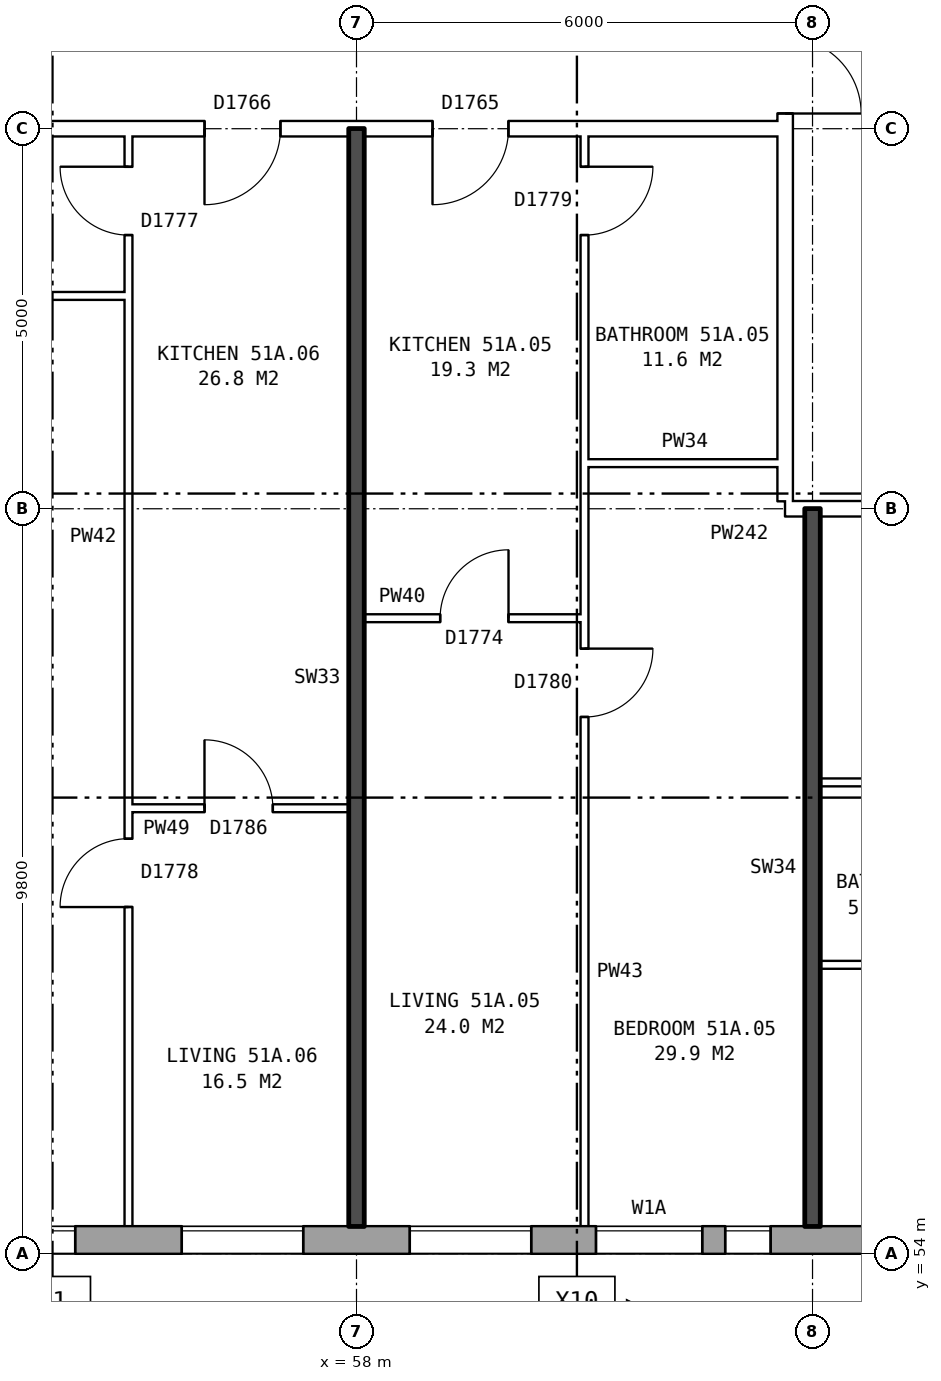
"""IFC4 building model, lengths in metres.
Left out: names, types, materials, properties, quantities, classifications, styles, units other than length and angle.
Written with IfcOpenShell. Run it as: python <this file> out.ifc"""

import sys

from ifc_helpers import new_model, si_unit, direction, frame, frame_2d, origin, place, context, subcontext, project, spatial, rectangle, extrude, element, fill, save


model = new_model("IFC4")
c1 = context("Model", 3, precision=1e-05, world=origin(), true_north=direction((0.0, 1.0)))
c2 = subcontext(c1, "Body", "Model", "MODEL_VIEW")
j1 = project(units=[si_unit("LENGTHUNIT", "METRE"), si_unit("PLANEANGLEUNIT", "RADIAN")], contexts=[c1])
p1 = place(None, origin())
s1 = spatial("IfcSite", under=j1, at=p1, CompositionType="ELEMENT")
p2 = place(p1, origin())
s2 = spatial("IfcBuilding", under=s1, at=p2, CompositionType="ELEMENT")
p3 = place(p2, frame((0.0, 0.0, 182.0)))
s3 = spatial("IfcBuildingStorey", under=s2, at=p3, CompositionType="ELEMENT", Elevation=182.0)
p4 = place(p3, frame((33.325, 54.18, 0.0), z_axis=(0.0, 0.0, 1.0), x_axis=(1.0, 0.0, 0.0)))
e1 = element("IfcWall", 1, at=p4, inside=s3, PredefinedType="STANDARD", context=c2, shape_type="SweptSolid", body=[
    extrude(rectangle(XDim=39.601, YDim=0.36, at=frame_2d((19.8, 0.0))), origin(), (0.0, 0.0, 1.0), 2.85),
])
p5 = place(p4, frame((1.375, 0.0, 0.8)))
e2 = element("IfcOpeningElement", 2, at=p5, cuts=e1, PredefinedType="OPENING", context=c2, shape_type="SweptSolid", body=[
    extrude(rectangle(XDim=1.6, YDim=1.8, at=frame_2d((0.8, 0.9))), frame((0.0, 0.19, 0.0), z_axis=(0.0, -1.0, 0.0), x_axis=(1.0, 0.0, 0.0)), (0.0, 0.0, 1.0), 0.38),
])
p6 = place(p4, frame((4.375, 0.0, 0.8)))
e3 = element("IfcOpeningElement", 3, at=p6, cuts=e1, PredefinedType="OPENING", context=c2, shape_type="SweptSolid", body=[
    extrude(rectangle(XDim=1.6, YDim=1.8, at=frame_2d((0.8, 0.9))), frame((0.0, 0.19, 0.0), z_axis=(0.0, -1.0, 0.0), x_axis=(1.0, 0.0, 0.0)), (0.0, 0.0, 1.0), 0.38),
])
p7 = place(p4, frame((6.875, 0.0, 0.8)))
e4 = element("IfcOpeningElement", 4, at=p7, cuts=e1, PredefinedType="OPENING", context=c2, shape_type="SweptSolid", body=[
    extrude(rectangle(XDim=1.0, YDim=1.8, at=frame_2d((0.5, 0.9))), frame((0.0, 0.19, 0.0), z_axis=(0.0, -1.0, 0.0), x_axis=(1.0, 0.0, 0.0)), (0.0, 0.0, 1.0), 0.38),
])
p8 = place(p4, frame((8.175, 0.0, 1.7)))
e5 = element("IfcOpeningElement", 5, at=p8, cuts=e1, PredefinedType="OPENING", context=c2, shape_type="SweptSolid", body=[
    extrude(rectangle(XDim=0.6, YDim=0.9, at=frame_2d((0.3, 0.45))), frame((0.0, 0.19, 0.0), z_axis=(0.0, -1.0, 0.0), x_axis=(1.0, 0.0, 0.0)), (0.0, 0.0, 1.0), 0.38),
])
p9 = place(p4, frame((13.375, 0.0, 0.8)))
e6 = element("IfcOpeningElement", 6, at=p9, cuts=e1, PredefinedType="OPENING", context=c2, shape_type="SweptSolid", body=[
    extrude(rectangle(XDim=1.6, YDim=1.8, at=frame_2d((0.8, 0.9))), frame((0.0, 0.19, 0.0), z_axis=(0.0, -1.0, 0.0), x_axis=(1.0, 0.0, 0.0)), (0.0, 0.0, 1.0), 0.38),
])
p10 = place(p4, frame((16.375, 0.0, 0.8)))
e7 = element("IfcOpeningElement", 7, at=p10, cuts=e1, PredefinedType="OPENING", context=c2, shape_type="SweptSolid", body=[
    extrude(rectangle(XDim=1.6, YDim=1.8, at=frame_2d((0.8, 0.9))), frame((0.0, 0.19, 0.0), z_axis=(0.0, -1.0, 0.0), x_axis=(1.0, 0.0, 0.0)), (0.0, 0.0, 1.0), 0.38),
])
p11 = place(p4, frame((19.375, 0.0, 0.8)))
e8 = element("IfcOpeningElement", 8, at=p11, cuts=e1, PredefinedType="OPENING", context=c2, shape_type="SweptSolid", body=[
    extrude(rectangle(XDim=1.6, YDim=1.8, at=frame_2d((0.8, 0.9))), frame((0.0, 0.19, 0.0), z_axis=(0.0, -1.0, 0.0), x_axis=(1.0, 0.0, 0.0)), (0.0, 0.0, 1.0), 0.38),
])
p12 = place(p4, frame((22.375, 0.0, 0.8)))
e9 = element("IfcOpeningElement", 9, at=p12, cuts=e1, PredefinedType="OPENING", context=c2, shape_type="SweptSolid", body=[
    extrude(rectangle(XDim=1.6, YDim=1.8, at=frame_2d((0.8, 0.9))), frame((0.0, 0.19, 0.0), z_axis=(0.0, -1.0, 0.0), x_axis=(1.0, 0.0, 0.0)), (0.0, 0.0, 1.0), 0.38),
])
p13 = place(p4, frame((25.375, 0.0, 0.8)))
e10 = element("IfcOpeningElement", 10, at=p13, cuts=e1, PredefinedType="OPENING", context=c2, shape_type="SweptSolid", body=[
    extrude(rectangle(XDim=1.6, YDim=1.8, at=frame_2d((0.8, 0.9))), frame((0.0, 0.19, 0.0), z_axis=(0.0, -1.0, 0.0), x_axis=(1.0, 0.0, 0.0)), (0.0, 0.0, 1.0), 0.38),
])
p14 = place(p4, frame((27.825, 0.0, 0.35)))
e11 = element("IfcOpeningElement", 11, at=p14, cuts=e1, PredefinedType="OPENING", context=c2, shape_type="SweptSolid", body=[
    extrude(rectangle(XDim=1.4, YDim=1.8, at=frame_2d((0.7, 0.9))), frame((0.0, 0.19, 0.0), z_axis=(0.0, -1.0, 0.0), x_axis=(1.0, 0.0, 0.0)), (0.0, 0.0, 1.0), 0.38),
])
p15 = place(p4, frame((31.375, 0.0, 0.8)))
e12 = element("IfcOpeningElement", 12, at=p15, cuts=e1, PredefinedType="OPENING", context=c2, shape_type="SweptSolid", body=[
    extrude(rectangle(XDim=1.6, YDim=1.8, at=frame_2d((0.8, 0.9))), frame((0.0, 0.19, 0.0), z_axis=(0.0, -1.0, 0.0), x_axis=(1.0, 0.0, 0.0)), (0.0, 0.0, 1.0), 0.38),
])
p16 = place(p4, frame((34.375, 0.0, 0.8)))
e13 = element("IfcOpeningElement", 13, at=p16, cuts=e1, PredefinedType="OPENING", context=c2, shape_type="SweptSolid", body=[
    extrude(rectangle(XDim=1.6, YDim=1.8, at=frame_2d((0.8, 0.9))), frame((0.0, 0.19, 0.0), z_axis=(0.0, -1.0, 0.0), x_axis=(1.0, 0.0, 0.0)), (0.0, 0.0, 1.0), 0.38),
])
p17 = place(p4, frame((37.375, 0.0, 0.8)))
e14 = element("IfcOpeningElement", 14, at=p17, cuts=e1, PredefinedType="OPENING", context=c2, shape_type="SweptSolid", body=[
    extrude(rectangle(XDim=1.6, YDim=1.8, at=frame_2d((0.8, 0.9))), frame((0.0, 0.19, 0.0), z_axis=(0.0, -1.0, 0.0), x_axis=(1.0, 0.0, 0.0)), (0.0, 0.0, 1.0), 0.38),
])
p18 = place(p4, frame((9.925, 0.0, 0.8)))
e15 = element("IfcOpeningElement", 15, at=p18, cuts=e1, PredefinedType="OPENING", context=c2, shape_type="SweptSolid", body=[
    extrude(rectangle(XDim=0.6, YDim=0.9, at=frame_2d((0.3, 0.45))), frame((0.0, 0.19, 0.0), z_axis=(0.0, -1.0, 0.0), x_axis=(1.0, 0.0, 0.0)), (0.0, 0.0, 1.0), 0.38),
])
p19 = place(p4, frame((10.875, 0.0, 0.8)))
e16 = element("IfcOpeningElement", 16, at=p19, cuts=e1, PredefinedType="OPENING", context=c2, shape_type="SweptSolid", body=[
    extrude(rectangle(XDim=1.6, YDim=1.8, at=frame_2d((0.8, 0.9))), frame((0.0, 0.19, 0.0), z_axis=(0.0, -1.0, 0.0), x_axis=(1.0, 0.0, 0.0)), (0.0, 0.0, 1.0), 0.38),
])
p20 = place(p4, frame((29.525, 0.0, 0.35)))
e17 = element("IfcOpeningElement", 17, at=p20, cuts=e1, PredefinedType="OPENING", context=c2, shape_type="SweptSolid", body=[
    extrude(rectangle(XDim=0.6, YDim=0.9, at=frame_2d((0.3, 0.45))), frame((0.0, 0.19, 0.0), z_axis=(0.0, -1.0, 0.0), x_axis=(1.0, 0.0, 0.0)), (0.0, 0.0, 1.0), 0.38),
])
p21 = place(p3, frame((63.64, 63.9, 0.0), z_axis=(0.0, 0.0, 1.0), x_axis=(0.0, 1.0, 0.0)))
e18 = element("IfcWall", 18, at=p21, inside=s3, PredefinedType="PARTITIONING", context=c2, shape_type="SweptSolid", body=[
    extrude(rectangle(XDim=12.2, YDim=0.2, at=frame_2d((6.1, 0.0))), origin(), (0.0, 0.0, 1.0), 2.85),
])
p22 = place(p21, frame((5.1, 0.0, 0.0)))
e19 = element("IfcOpeningElement", 19, at=p22, cuts=e18, PredefinedType="OPENING", context=c2, shape_type="SweptSolid", body=[
    extrude(rectangle(XDim=2.0, YDim=2.1, at=frame_2d((1.0, 1.05))), frame((0.0, 0.11, 0.0), z_axis=(0.0, -1.0, 0.0), x_axis=(1.0, 0.0, 0.0)), (0.0, 0.0, 1.0), 0.22),
])
p23 = place(p3, frame((64.1, 57.8, 0.0), z_axis=(0.0, 0.0, 1.0), x_axis=(1.0, 0.0, 0.0)))
e20 = element("IfcWall", 20, at=p23, inside=s3, PredefinedType="PARTITIONING", context=c2, shape_type="SweptSolid", body=[
    extrude(rectangle(XDim=2.3, YDim=0.1, at=frame_2d((1.15, 0.0))), origin(), (0.0, 0.0, 1.0), 2.85),
])
p24 = place(p3, frame((55.0, 59.86, 0.0), z_axis=(0.0, 0.0, 1.0), x_axis=(1.0, 0.0, 0.0)))
e21 = element("IfcWall", 21, at=p24, inside=s3, PredefinedType="PARTITIONING", context=c2, shape_type="SweptSolid", body=[
    extrude(rectangle(XDim=2.9, YDim=0.1, at=frame_2d((1.45, 0.0))), origin(), (0.0, 0.0, 1.0), 2.85),
])
p25 = place(p24, frame((1.0, 0.0, 0.0)))
e22 = element("IfcOpeningElement", 22, at=p25, cuts=e21, PredefinedType="OPENING", context=c2, shape_type="SweptSolid", body=[
    extrude(rectangle(XDim=0.9, YDim=2.1, at=frame_2d((0.45, 1.05))), frame((0.0, 0.06, 0.0), z_axis=(0.0, -1.0, 0.0), x_axis=(1.0, 0.0, 0.0)), (0.0, 0.0, 1.0), 0.12),
])
p26 = place(p3, frame((64.1, 60.2, 0.0), z_axis=(0.0, 0.0, 1.0), x_axis=(1.0, 0.0, 0.0)))
e23 = element("IfcWall", 23, at=p26, inside=s3, PredefinedType="PARTITIONING", context=c2, shape_type="SweptSolid", body=[
    extrude(rectangle(XDim=5.8, YDim=0.1, at=frame_2d((2.9, 0.0))), origin(), (0.0, 0.0, 1.0), 2.85),
])
p27 = place(p26, frame((3.6, 0.0, 0.0)))
e24 = element("IfcOpeningElement", 24, at=p27, cuts=e23, PredefinedType="OPENING", context=c2, shape_type="SweptSolid", body=[
    extrude(rectangle(XDim=0.9, YDim=2.1, at=frame_2d((0.45, 1.05))), frame((0.0, 0.06, 0.0), z_axis=(0.0, -1.0, 0.0), x_axis=(1.0, 0.0, 0.0)), (0.0, 0.0, 1.0), 0.12),
])
p28 = place(p26, frame((0.7, 0.0, 0.0)))
e25 = element("IfcOpeningElement", 25, at=p28, cuts=e23, PredefinedType="OPENING", context=c2, shape_type="SweptSolid", body=[
    extrude(rectangle(XDim=0.9, YDim=2.1, at=frame_2d((0.45, 1.05))), frame((0.0, 0.06, 0.0), z_axis=(0.0, -1.0, 0.0), x_axis=(1.0, 0.0, 0.0)), (0.0, 0.0, 1.0), 0.12),
])
p29 = place(p3, frame((58.1, 62.36, 0.0), z_axis=(0.0, 0.0, 1.0), x_axis=(1.0, 0.0, 0.0)))
e26 = element("IfcWall", 26, at=p29, inside=s3, PredefinedType="PARTITIONING", context=c2, shape_type="SweptSolid", body=[
    extrude(rectangle(XDim=2.9, YDim=0.1, at=frame_2d((1.45, 0.0))), origin(), (0.0, 0.0, 1.0), 2.85),
])
p30 = place(p29, frame((1.0, 0.0, 0.0)))
e27 = element("IfcOpeningElement", 27, at=p30, cuts=e26, PredefinedType="OPENING", context=c2, shape_type="SweptSolid", body=[
    extrude(rectangle(XDim=0.9, YDim=2.1, at=frame_2d((0.45, 1.05))), frame((0.0, 0.06, 0.0), z_axis=(0.0, -1.0, 0.0), x_axis=(1.0, 0.0, 0.0)), (0.0, 0.0, 1.0), 0.12),
])
p31 = place(p3, frame((63.64, 63.8, 0.0), z_axis=(0.0, 0.0, 1.0), x_axis=(1.0, 0.0, 0.0)))
e28 = element("IfcWall", 28, at=p31, inside=s3, PredefinedType="PARTITIONING", context=c2, shape_type="SweptSolid", body=[
    extrude(rectangle(XDim=3.0, YDim=0.2, at=frame_2d((1.5, 0.0))), origin(), (0.0, 0.0, 1.0), 2.85),
])
p32 = place(p31, frame((1.18, 0.0, 0.0)))
e29 = element("IfcOpeningElement", 29, at=p32, cuts=e28, PredefinedType="OPENING", context=c2, shape_type="SweptSolid", body=[
    extrude(rectangle(XDim=1.0, YDim=2.1, at=frame_2d((0.5, 1.05))), frame((0.0, 0.11, 0.0), z_axis=(0.0, -1.0, 0.0), x_axis=(1.0, 0.0, 0.0)), (0.0, 0.0, 1.0), 0.22),
])
p33 = place(p3, frame((61.0, 64.4, 0.0), z_axis=(0.0, 0.0, 1.0), x_axis=(1.0, 0.0, 0.0)))
e30 = element("IfcWall", 30, at=p33, inside=s3, PredefinedType="PARTITIONING", context=c2, shape_type="SweptSolid", body=[
    extrude(rectangle(XDim=2.64, YDim=0.1, at=frame_2d((1.32, 0.0))), origin(), (0.0, 0.0, 1.0), 2.85),
])
p34 = place(p3, frame((52.1, 66.6, 0.0), z_axis=(0.0, 0.0, 1.0), x_axis=(1.0, 0.0, 0.0)))
e31 = element("IfcWall", 31, at=p34, inside=s3, PredefinedType="PARTITIONING", context=c2, shape_type="SweptSolid", body=[
    extrude(rectangle(XDim=2.9, YDim=0.1, at=frame_2d((1.45, 0.0))), origin(), (0.0, 0.0, 1.0), 2.85),
])
p35 = place(p3, frame((44.36, 68.8, 0.0), z_axis=(0.0, 0.0, 1.0), x_axis=(1.0, 0.0, 0.0)))
e32 = element("IfcWall", 32, at=p35, inside=s3, PredefinedType="PARTITIONING", context=c2, shape_type="SweptSolid", body=[
    extrude(rectangle(XDim=19.28, YDim=0.2, at=frame_2d((9.64, 0.0))), origin(), (0.0, 0.0, 1.0), 2.85),
])
p36 = place(p35, frame((14.64, 0.0, 0.0)))
e33 = element("IfcOpeningElement", 33, at=p36, cuts=e32, PredefinedType="OPENING", context=c2, shape_type="SweptSolid", body=[
    extrude(rectangle(XDim=1.0, YDim=2.1, at=frame_2d((0.5, 1.05))), frame((0.0, 0.11, 0.0), z_axis=(0.0, -1.0, 0.0), x_axis=(1.0, 0.0, 0.0)), (0.0, 0.0, 1.0), 0.22),
])
p37 = place(p35, frame((11.64, 0.0, 0.0)))
e34 = element("IfcOpeningElement", 34, at=p37, cuts=e32, PredefinedType="OPENING", context=c2, shape_type="SweptSolid", body=[
    extrude(rectangle(XDim=1.0, YDim=2.1, at=frame_2d((0.5, 1.05))), frame((0.0, 0.11, 0.0), z_axis=(0.0, -1.0, 0.0), x_axis=(1.0, 0.0, 0.0)), (0.0, 0.0, 1.0), 0.22),
])
p38 = place(p35, frame((5.64, 0.0, 0.0)))
e35 = element("IfcOpeningElement", 35, at=p38, cuts=e32, PredefinedType="OPENING", context=c2, shape_type="SweptSolid", body=[
    extrude(rectangle(XDim=1.0, YDim=2.1, at=frame_2d((0.5, 1.05))), frame((0.0, 0.11, 0.0), z_axis=(0.0, -1.0, 0.0), x_axis=(1.0, 0.0, 0.0)), (0.0, 0.0, 1.0), 0.22),
])
p39 = place(p3, frame((55.0, 54.36, 0.0), z_axis=(0.0, 0.0, 1.0), x_axis=(0.0, 1.0, 0.0)))
e36 = element("IfcWall", 36, at=p39, inside=s3, PredefinedType="PARTITIONING", context=c2, shape_type="SweptSolid", body=[
    extrude(rectangle(XDim=14.34, YDim=0.1, at=frame_2d((7.17, 0.0))), origin(), (0.0, 0.0, 1.0), 2.85),
])
p40 = place(p39, frame((4.2, 0.0, 0.0)))
e37 = element("IfcOpeningElement", 37, at=p40, cuts=e36, PredefinedType="OPENING", context=c2, shape_type="SweptSolid", body=[
    extrude(rectangle(XDim=0.9, YDim=2.1, at=frame_2d((0.45, 1.05))), frame((0.0, 0.06, 0.0), z_axis=(0.0, -1.0, 0.0), x_axis=(1.0, 0.0, 0.0)), (0.0, 0.0, 1.0), 0.12),
])
p41 = place(p39, frame((13.04, 0.0, 0.0)))
e38 = element("IfcOpeningElement", 38, at=p41, cuts=e36, PredefinedType="OPENING", context=c2, shape_type="SweptSolid", body=[
    extrude(rectangle(XDim=0.9, YDim=2.1, at=frame_2d((0.45, 1.05))), frame((0.0, 0.06, 0.0), z_axis=(0.0, -1.0, 0.0), x_axis=(1.0, 0.0, 0.0)), (0.0, 0.0, 1.0), 0.12),
])
p42 = place(p3, frame((58.0, 54.36, 0.0), z_axis=(0.0, 0.0, 1.0), x_axis=(0.0, 1.0, 0.0)))
e39 = element("IfcWall", 39, at=p42, inside=s3, PredefinedType="SOLIDWALL", context=c2, shape_type="SweptSolid", body=[
    extrude(rectangle(XDim=14.44, YDim=0.2, at=frame_2d((7.22, 0.0))), origin(), (0.0, 0.0, 1.0), 2.85),
])
p43 = place(p3, frame((61.0, 54.36, 0.0), z_axis=(0.0, 0.0, 1.0), x_axis=(0.0, 1.0, 0.0)))
e40 = element("IfcWall", 40, at=p43, inside=s3, PredefinedType="PARTITIONING", context=c2, shape_type="SweptSolid", body=[
    extrude(rectangle(XDim=14.34, YDim=0.1, at=frame_2d((7.17, 0.0))), origin(), (0.0, 0.0, 1.0), 2.85),
])
p44 = place(p43, frame((6.7, 0.0, 0.0)))
e41 = element("IfcOpeningElement", 41, at=p44, cuts=e40, PredefinedType="OPENING", context=c2, shape_type="SweptSolid", body=[
    extrude(rectangle(XDim=0.9, YDim=2.1, at=frame_2d((0.45, 1.05))), frame((0.0, 0.06, 0.0), z_axis=(0.0, -1.0, 0.0), x_axis=(1.0, 0.0, 0.0)), (0.0, 0.0, 1.0), 0.12),
])
p45 = place(p43, frame((13.04, 0.0, 0.0)))
e42 = element("IfcOpeningElement", 42, at=p45, cuts=e40, PredefinedType="OPENING", context=c2, shape_type="SweptSolid", body=[
    extrude(rectangle(XDim=0.9, YDim=2.1, at=frame_2d((0.45, 1.05))), frame((0.0, 0.06, 0.0), z_axis=(0.0, -1.0, 0.0), x_axis=(1.0, 0.0, 0.0)), (0.0, 0.0, 1.0), 0.12),
])
p46 = place(p3, frame((64.0, 54.36, 0.0), z_axis=(0.0, 0.0, 1.0), x_axis=(0.0, 1.0, 0.0)))
e43 = element("IfcWall", 43, at=p46, inside=s3, PredefinedType="SOLIDWALL", context=c2, shape_type="SweptSolid", body=[
    extrude(rectangle(XDim=9.44, YDim=0.2, at=frame_2d((4.72, 0.0))), origin(), (0.0, 0.0, 1.0), 2.85),
])
p47 = place(p11, origin())
e44 = element("IfcWindow", 44, at=p47, inside=s3, PartitioningType="SINGLE_PANEL", PredefinedType="WINDOW", context=c2, shape_type="SweptSolid", body=[
    extrude(rectangle(XDim=1.6, YDim=1.8, at=frame_2d((0.8, 0.9))), frame((0.0, 0.15, 0.0), z_axis=(0.0, -1.0, 0.0), x_axis=(1.0, 0.0, 0.0)), (0.0, 0.0, 1.0), 0.06),
])
fill(e8, e44)
p48 = place(p12, origin())
e45 = element("IfcWindow", 45, at=p48, inside=s3, PartitioningType="SINGLE_PANEL", PredefinedType="WINDOW", context=c2, shape_type="SweptSolid", body=[
    extrude(rectangle(XDim=1.6, YDim=1.8, at=frame_2d((0.8, 0.9))), frame((0.0, 0.15, 0.0), z_axis=(0.0, -1.0, 0.0), x_axis=(1.0, 0.0, 0.0)), (0.0, 0.0, 1.0), 0.06),
])
fill(e9, e45)
p49 = place(p13, origin())
e46 = element("IfcWindow", 46, at=p49, inside=s3, PartitioningType="SINGLE_PANEL", PredefinedType="WINDOW", context=c2, shape_type="SweptSolid", body=[
    extrude(rectangle(XDim=1.6, YDim=1.8, at=frame_2d((0.8, 0.9))), frame((0.0, 0.15, 0.0), z_axis=(0.0, -1.0, 0.0), x_axis=(1.0, 0.0, 0.0)), (0.0, 0.0, 1.0), 0.06),
])
fill(e10, e46)
p50 = place(p14, origin())
e47 = element("IfcWindow", 47, at=p50, inside=s3, PartitioningType="SINGLE_PANEL", PredefinedType="WINDOW", context=c2, shape_type="SweptSolid", body=[
    extrude(rectangle(XDim=1.4, YDim=1.8, at=frame_2d((0.7, 0.9))), frame((0.0, 0.15, 0.0), z_axis=(0.0, -1.0, 0.0), x_axis=(1.0, 0.0, 0.0)), (0.0, 0.0, 1.0), 0.06),
])
fill(e11, e47)
p51 = place(p22, frame((2.0, 0.0, 0.0), z_axis=(0.0, 0.0, 1.0), x_axis=(-1.0, 0.0, 0.0)))
e48 = element("IfcDoor", 48, at=p51, inside=s3, OperationType="DOUBLE_DOOR_SINGLE_SWING", PredefinedType="DOOR", context=c2, shape_type="SweptSolid", body=[
    extrude(rectangle(XDim=2.0, YDim=2.1, at=frame_2d((1.0, 1.05))), frame((0.0, 0.025, 0.0), z_axis=(0.0, -1.0, 0.0), x_axis=(1.0, 0.0, 0.0)), (0.0, 0.0, 1.0), 0.05),
])
fill(e19, e48)
p52 = place(p44, frame((0.9, 0.0, 0.0), z_axis=(0.0, 0.0, 1.0), x_axis=(-1.0, 0.0, 0.0)))
e49 = element("IfcDoor", 49, at=p52, inside=s3, OperationType="SINGLE_SWING_LEFT", PredefinedType="DOOR", context=c2, shape_type="SweptSolid", body=[
    extrude(rectangle(XDim=0.9, YDim=2.1, at=frame_2d((0.45, 1.05))), frame((0.0, 0.025, 0.0), z_axis=(0.0, -1.0, 0.0), x_axis=(1.0, 0.0, 0.0)), (0.0, 0.0, 1.0), 0.05),
])
fill(e41, e49)
p53 = place(p36, frame((1.0, 0.0, 0.0), z_axis=(0.0, 0.0, 1.0), x_axis=(-1.0, 0.0, 0.0)))
e50 = element("IfcDoor", 50, at=p53, inside=s3, OperationType="SINGLE_SWING_RIGHT", PredefinedType="DOOR", context=c2, shape_type="SweptSolid", body=[
    extrude(rectangle(XDim=1.0, YDim=2.1, at=frame_2d((0.5, 1.05))), frame((0.0, 0.025, 0.0), z_axis=(0.0, -1.0, 0.0), x_axis=(1.0, 0.0, 0.0)), (0.0, 0.0, 1.0), 0.05),
])
fill(e33, e50)
p54 = place(p30, origin())
e51 = element("IfcDoor", 51, at=p54, inside=s3, OperationType="SINGLE_SWING_RIGHT", PredefinedType="DOOR", context=c2, shape_type="SweptSolid", body=[
    extrude(rectangle(XDim=0.9, YDim=2.1, at=frame_2d((0.45, 1.05))), frame((0.0, 0.025, 0.0), z_axis=(0.0, -1.0, 0.0), x_axis=(1.0, 0.0, 0.0)), (0.0, 0.0, 1.0), 0.05),
])
fill(e27, e51)
p55 = place(p45, frame((0.9, 0.0, 0.0), z_axis=(0.0, 0.0, 1.0), x_axis=(-1.0, 0.0, 0.0)))
e52 = element("IfcDoor", 52, at=p55, inside=s3, OperationType="SINGLE_SWING_LEFT", PredefinedType="DOOR", context=c2, shape_type="SweptSolid", body=[
    extrude(rectangle(XDim=0.9, YDim=2.1, at=frame_2d((0.45, 1.05))), frame((0.0, 0.025, 0.0), z_axis=(0.0, -1.0, 0.0), x_axis=(1.0, 0.0, 0.0)), (0.0, 0.0, 1.0), 0.05),
])
fill(e42, e52)
p56 = place(p40, origin())
e53 = element("IfcDoor", 53, at=p56, inside=s3, OperationType="SINGLE_SWING_LEFT", PredefinedType="DOOR", context=c2, shape_type="SweptSolid", body=[
    extrude(rectangle(XDim=0.9, YDim=2.1, at=frame_2d((0.45, 1.05))), frame((0.0, 0.025, 0.0), z_axis=(0.0, -1.0, 0.0), x_axis=(1.0, 0.0, 0.0)), (0.0, 0.0, 1.0), 0.05),
])
fill(e37, e53)
p57 = place(p37, frame((1.0, 0.0, 0.0), z_axis=(0.0, 0.0, 1.0), x_axis=(-1.0, 0.0, 0.0)))
e54 = element("IfcDoor", 54, at=p57, inside=s3, OperationType="SINGLE_SWING_RIGHT", PredefinedType="DOOR", context=c2, shape_type="SweptSolid", body=[
    extrude(rectangle(XDim=1.0, YDim=2.1, at=frame_2d((0.5, 1.05))), frame((0.0, 0.025, 0.0), z_axis=(0.0, -1.0, 0.0), x_axis=(1.0, 0.0, 0.0)), (0.0, 0.0, 1.0), 0.05),
])
fill(e34, e54)
p58 = place(p25, origin())
e55 = element("IfcDoor", 55, at=p58, inside=s3, OperationType="SINGLE_SWING_LEFT", PredefinedType="DOOR", context=c2, shape_type="SweptSolid", body=[
    extrude(rectangle(XDim=0.9, YDim=2.1, at=frame_2d((0.45, 1.05))), frame((0.0, 0.025, 0.0), z_axis=(0.0, -1.0, 0.0), x_axis=(1.0, 0.0, 0.0)), (0.0, 0.0, 1.0), 0.05),
])
fill(e22, e55)
p59 = place(p41, origin())
e56 = element("IfcDoor", 56, at=p59, inside=s3, OperationType="SINGLE_SWING_RIGHT", PredefinedType="DOOR", context=c2, shape_type="SweptSolid", body=[
    extrude(rectangle(XDim=0.9, YDim=2.1, at=frame_2d((0.45, 1.05))), frame((0.0, 0.025, 0.0), z_axis=(0.0, -1.0, 0.0), x_axis=(1.0, 0.0, 0.0)), (0.0, 0.0, 1.0), 0.05),
])
fill(e38, e56)
p60 = place(p20, origin())
e57 = element("IfcWindow", 57, at=p60, inside=s3, PartitioningType="SINGLE_PANEL", PredefinedType="WINDOW", context=c2, shape_type="SweptSolid", body=[
    extrude(rectangle(XDim=0.6, YDim=0.9, at=frame_2d((0.3, 0.45))), frame((0.0, 0.15, 0.0), z_axis=(0.0, -1.0, 0.0), x_axis=(1.0, 0.0, 0.0)), (0.0, 0.0, 1.0), 0.06),
])
fill(e17, e57)
save(model, sys.argv[1])
